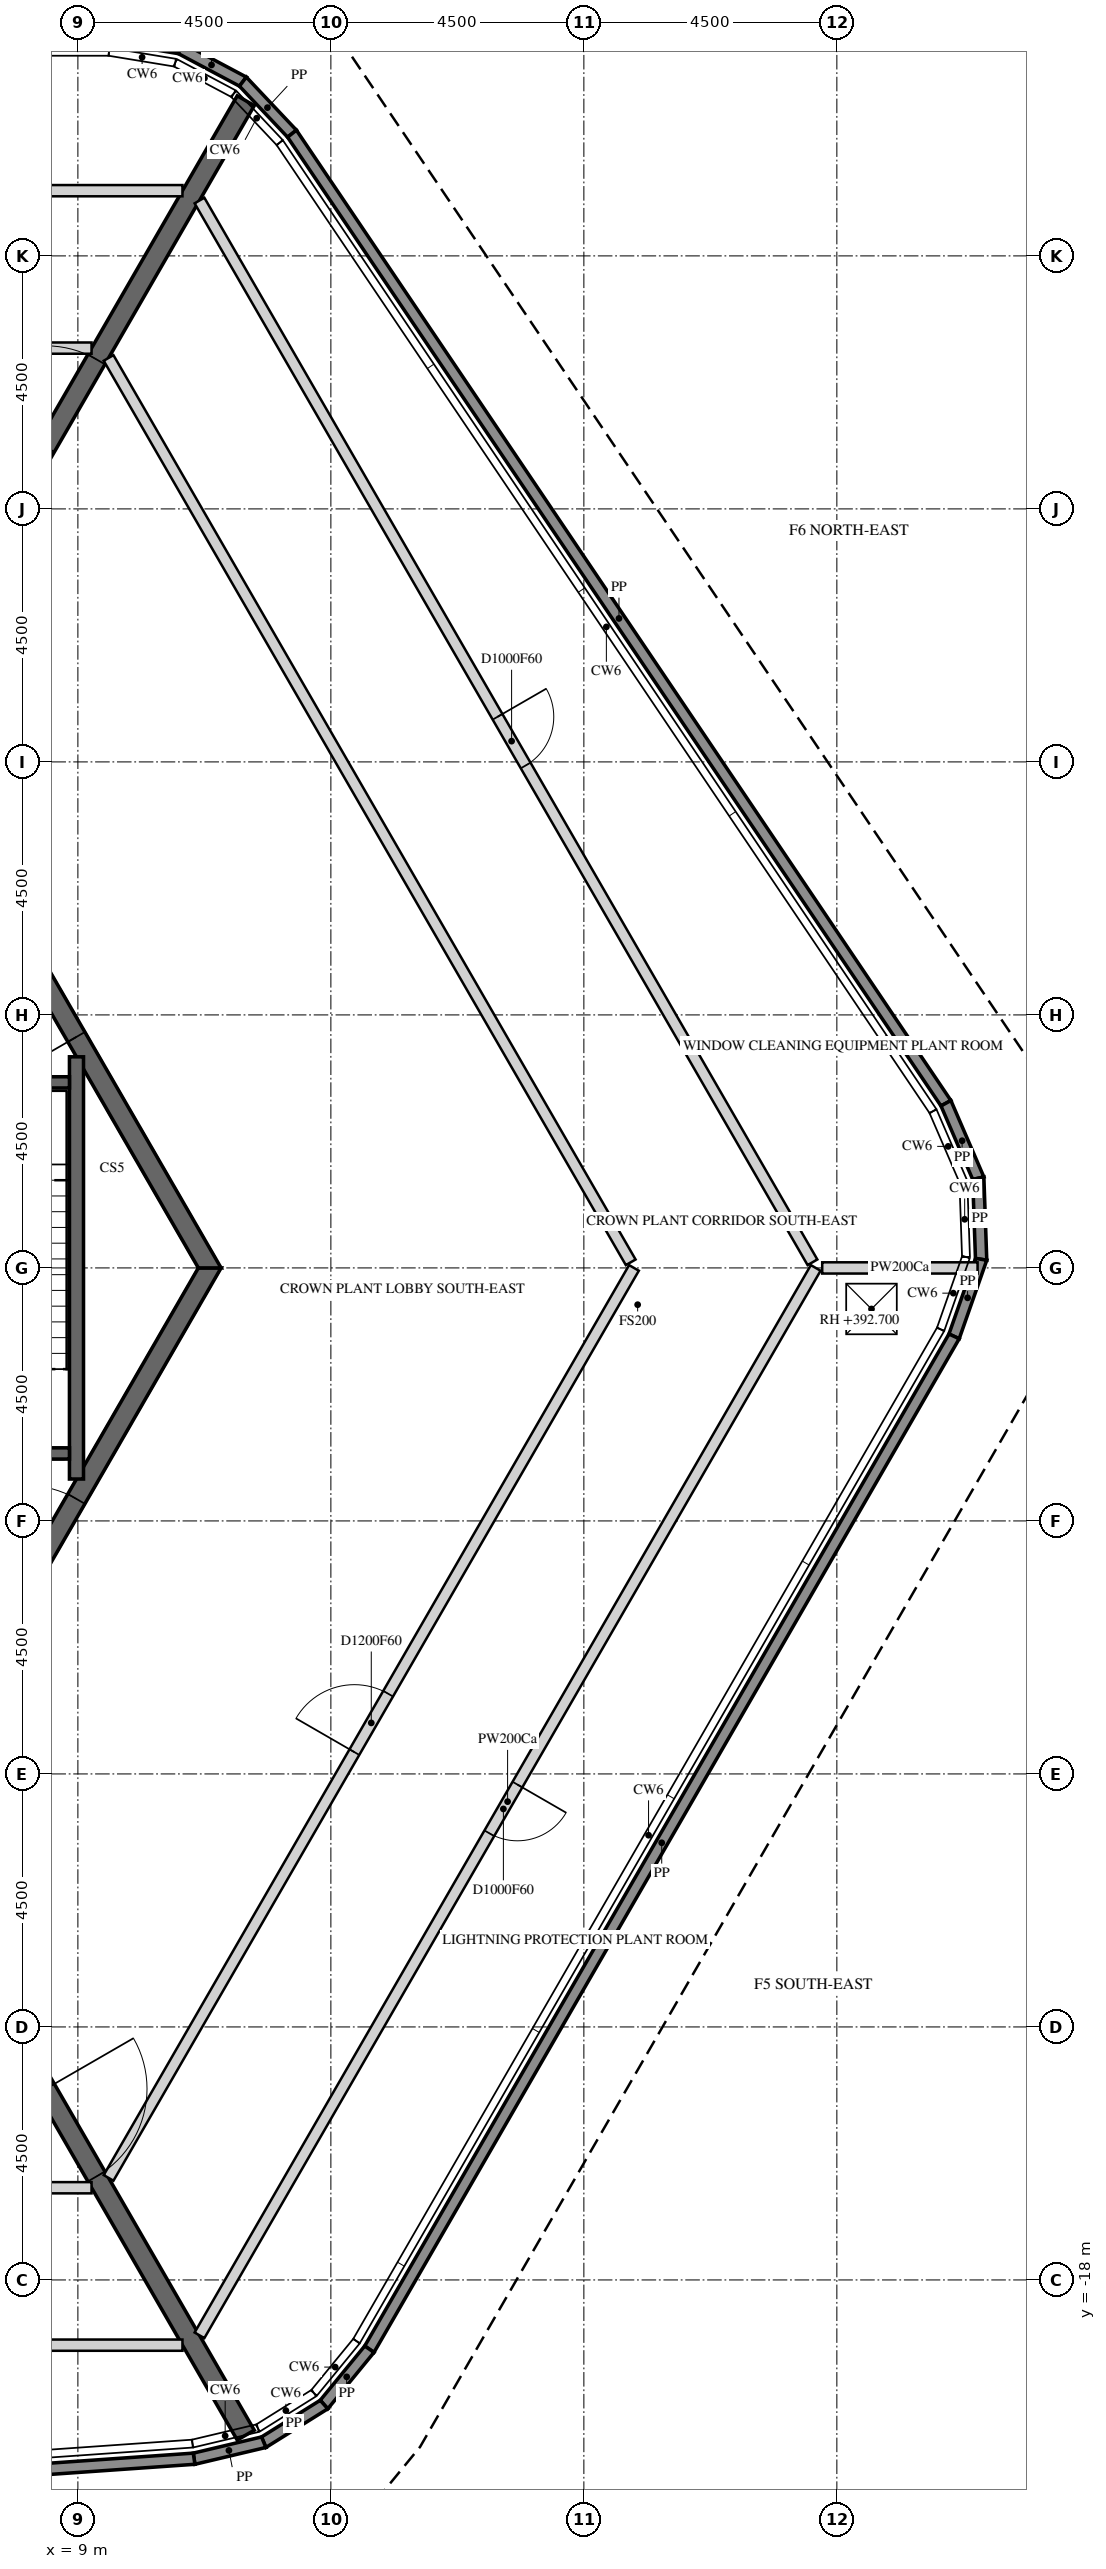
"""IFC4 building model, lengths in metres.
Left out: names, types, materials, properties, quantities, classifications, styles, units other than length and angle.
Written with IfcOpenShell. Run it as: python <this file> out.ifc"""

import sys

from ifc_helpers import new_model, si_unit, direction, frame, frame_2d, origin, origin_2d, place, context, subcontext, project, spatial, polyline, rectangle, outline, extrude, element, fill, save


model = new_model("IFC4")
c1 = context("Model", 3, precision=1e-05, world=origin(), true_north=direction((0.0, 1.0)))
c2 = subcontext(c1, "Body", "Model", "MODEL_VIEW")
j1 = project(units=[si_unit("LENGTHUNIT", "METRE"), si_unit("PLANEANGLEUNIT", "RADIAN")], contexts=[c1])
p1 = place(None, origin())
s1 = spatial("IfcSite", under=j1, at=p1, CompositionType="ELEMENT")
p2 = place(p1, origin())
s2 = spatial("IfcBuilding", under=s1, at=p2, CompositionType="ELEMENT")
p3 = place(p2, frame((0.0, 0.0, 388.2)))
s3 = spatial("IfcBuildingStorey", under=s2, at=p3, CompositionType="ELEMENT", Elevation=388.2)
p4 = place(p3, frame((9.562, 21.9, 4.5), z_axis=(0.0, 0.0, 1.0), x_axis=(0.986779937267, -0.162065898346, 0.0)))
e1 = element("IfcWall", 1, at=p4, inside=s3, PredefinedType="PARAPET", context=c2, shape_type="SweptSolid", body=[
    extrude(outline(polyline([(0.008, -0.1), (1.257, -0.1), (1.289, 0.1), (-0.008, 0.1), (0.008, -0.1)])), origin(), (0.0, 0.0, 1.0), 1.1),
])
p5 = place(p3, frame((10.819, 21.694, 4.5), z_axis=(0.0, 0.0, 1.0), x_axis=(0.88290815292, -0.469545731008, 0.0)))
e2 = element("IfcWall", 2, at=p5, inside=s3, PredefinedType="PARAPET", context=c2, shape_type="SweptSolid", body=[
    extrude(outline(polyline([(0.016, -0.1), (1.248, -0.1), (1.281, 0.1), (-0.016, 0.1), (0.016, -0.1)])), origin(), (0.0, 0.0, 1.0), 1.1),
])
p6 = place(p3, frame((11.935, 21.1, 4.5), z_axis=(0.0, 0.0, 1.0), x_axis=(0.686285527981, -0.727332230885, 0.0)))
e3 = element("IfcWall", 3, at=p6, inside=s3, PredefinedType="PARAPET", context=c2, shape_type="SweptSolid", body=[
    extrude(outline(polyline([(0.016, -0.1), (1.265, -0.1), (1.281, 0.1), (-0.016, 0.1), (0.016, -0.1)])), origin(), (0.0, 0.0, 1.0), 1.1),
])
p7 = place(p3, frame((12.809, 20.174, 4.5), z_axis=(0.0, 0.0, 1.0), x_axis=(0.559199078033, -0.829033407727, 0.0)))
e4 = element("IfcWall", 4, at=p7, inside=s3, PredefinedType="PARAPET", context=c2, shape_type="SweptSolid", body=[
    extrude(outline(polyline([(0.008, -0.1), (20.792, -0.1), (20.81, 0.1), (-0.008, 0.1), (0.008, -0.1)])), origin(), (0.0, 0.0, 1.0), 1.1),
])
p8 = place(p3, frame((24.44, 2.929, 4.5), z_axis=(0.0, 0.0, 1.0), x_axis=(0.39594663585, -0.918273522192, 0.0)))
e5 = element("IfcWall", 5, at=p8, inside=s3, PredefinedType="PARAPET", context=c2, shape_type="SweptSolid", body=[
    extrude(outline(polyline([(0.009, -0.1), (1.434, -0.1), (1.471, 0.1), (-0.009, 0.1), (0.009, -0.1)])), origin(), (0.0, 0.0, 1.0), 1.1),
])
p9 = place(p3, frame((25.016, 1.595, 4.5), z_axis=(0.0, 0.0, 1.0), x_axis=(0.034852691187, -0.999392460406, 0.0)))
e6 = element("IfcWall", 6, at=p9, inside=s3, PredefinedType="PARAPET", context=c2, shape_type="SweptSolid", body=[
    extrude(outline(polyline([(0.019, -0.1), (1.424, -0.1), (1.462, 0.1), (-0.019, 0.1), (0.019, -0.1)])), origin(), (0.0, 0.0, 1.0), 1.1),
])
p10 = place(p3, frame((25.066, 0.153, 4.5), z_axis=(0.0, 0.0, 1.0), x_axis=(-0.330964304762, -0.943643274216, 0.0)))
e7 = element("IfcWall", 7, at=p10, inside=s3, PredefinedType="PARAPET", context=c2, shape_type="SweptSolid", body=[
    extrude(outline(polyline([(0.019, -0.1), (1.443, -0.1), (1.462, 0.1), (-0.019, 0.1), (0.019, -0.1)])), origin(), (0.0, 0.0, 1.0), 1.1),
])
p11 = place(p3, frame((24.585, -1.217, 4.5), z_axis=(0.0, 0.0, 1.0), x_axis=(-0.500005572435, -0.866022186514, 0.0)))
e8 = element("IfcWall", 8, at=p11, inside=s3, PredefinedType="PARAPET", context=c2, shape_type="SweptSolid", body=[
    extrude(outline(polyline([(0.009, -0.1), (20.793, -0.1), (20.809, 0.1), (-0.009, 0.1), (0.009, -0.1)])), origin(), (0.0, 0.0, 1.0), 1.1),
])
p12 = place(p3, frame((14.185, -19.231, 4.5), z_axis=(0.0, 0.0, 1.0), x_axis=(-0.633728573492, -0.773555489374, 0.0)))
e9 = element("IfcWall", 9, at=p12, inside=s3, PredefinedType="PARAPET", context=c2, shape_type="SweptSolid", body=[
    extrude(outline(polyline([(0.008, -0.1), (1.257, -0.1), (1.289, 0.1), (-0.008, 0.1), (0.008, -0.1)])), origin(), (0.0, 0.0, 1.0), 1.1),
])
p13 = place(p3, frame((13.378, -20.216, 4.5), z_axis=(0.0, 0.0, 1.0), x_axis=(-0.848139277309, -0.529773315943, 0.0)))
e10 = element("IfcWall", 10, at=p13, inside=s3, PredefinedType="PARAPET", context=c2, shape_type="SweptSolid", body=[
    extrude(outline(polyline([(0.016, -0.1), (1.248, -0.1), (1.281, 0.1), (-0.016, 0.1), (0.016, -0.1)])), origin(), (0.0, 0.0, 1.0), 1.1),
])
p14 = place(p3, frame((12.305, -20.886, 4.5), z_axis=(0.0, 0.0, 1.0), x_axis=(-0.973015728144, -0.230738797744, 0.0)))
e11 = element("IfcWall", 11, at=p14, inside=s3, PredefinedType="PARAPET", context=c2, shape_type="SweptSolid", body=[
    extrude(outline(polyline([(0.016, -0.1), (1.265, -0.1), (1.281, 0.1), (-0.016, 0.1), (0.016, -0.1)])), origin(), (0.0, 0.0, 1.0), 1.1),
])
p15 = place(p3, frame((11.067, -21.18, 4.5), z_axis=(0.0, 0.0, 1.0), x_axis=(-0.997564286722, -0.06975309209, 0.0)))
e12 = element("IfcWall", 12, at=p15, inside=s3, PredefinedType="PARAPET", context=c2, shape_type="SweptSolid", body=[
    extrude(outline(polyline([(0.008, -0.1), (20.792, -0.1), (20.81, 0.1), (-0.008, 0.1), (0.008, -0.1)])), origin(), (0.0, 0.0, 1.0), 1.1),
])
p16 = place(p3, frame((5.673, -9.825, -0.2), z_axis=(0.0, 0.0, 1.0), x_axis=(0.499995046907, 0.866028263435, 0.0)))
e13 = element("IfcWall", 13, at=p16, inside=s3, PredefinedType="SHEAR", context=c2, shape_type="SweptSolid", body=[
    extrude(outline(polyline([(-0.101, -0.175), (11.446, -0.175), (11.244, 0.175), (0.101, 0.175), (-0.101, -0.175)])), origin(), (0.0, 0.0, 1.0), 4.5),
])
p17 = place(p16, frame((4.801, 0.0, 0.2)))
e14 = element("IfcOpeningElement", 14, at=p17, cuts=e13, PredefinedType="OPENING", context=c2, shape_type="SweptSolid", body=[
    extrude(rectangle(XDim=1.8, YDim=2.4, at=frame_2d((0.9, 1.2))), frame((0.0, 0.185, 0.0), z_axis=(0.0, -1.0, 0.0), x_axis=(1.0, 0.0, 0.0)), (0.0, 0.0, 1.0), 0.37),
])
p18 = place(p3, frame((11.345, 0.0, -0.2), z_axis=(0.0, 0.0, 1.0), x_axis=(-0.499995046907, 0.866028263435, 0.0)))
e15 = element("IfcWall", 15, at=p18, inside=s3, PredefinedType="SHEAR", context=c2, shape_type="SweptSolid", body=[
    extrude(outline(polyline([(-0.101, -0.175), (11.446, -0.175), (11.244, 0.175), (0.101, 0.175), (-0.101, -0.175)])), origin(), (0.0, 0.0, 1.0), 4.5),
])
p19 = place(p18, frame((4.744, 0.0, 0.2)))
e16 = element("IfcOpeningElement", 16, at=p19, cuts=e15, PredefinedType="OPENING", context=c2, shape_type="SweptSolid", body=[
    extrude(rectangle(XDim=1.8, YDim=2.4, at=frame_2d((0.9, 1.2))), frame((0.0, 0.185, 0.0), z_axis=(0.0, -1.0, 0.0), x_axis=(1.0, 0.0, 0.0)), (0.0, 0.0, 1.0), 0.37),
])
p20 = place(p3, frame((5.773, 10.0, -0.2), z_axis=(0.0, 0.0, 1.0), x_axis=(0.50001273609, 0.866018050475, 0.0)))
e17 = element("IfcWall", 17, at=p20, inside=s3, PredefinedType="SHEAR", context=c2, shape_type="SweptSolid", body=[
    extrude(rectangle(XDim=12.425, YDim=0.35, at=frame_2d((6.212, 0.0))), origin(), (0.0, 0.0, 1.0), 4.5),
])
p21 = place(p20, frame((5.312, 0.0, 0.2)))
e18 = element("IfcOpeningElement", 18, at=p21, cuts=e17, PredefinedType="OPENING", context=c2, shape_type="SweptSolid", body=[
    extrude(rectangle(XDim=1.8, YDim=2.4, at=frame_2d((0.9, 1.2))), frame((0.0, 0.185, 0.0), z_axis=(0.0, -1.0, 0.0), x_axis=(1.0, 0.0, 0.0)), (0.0, 0.0, 1.0), 0.37),
])
p22 = place(p3, frame((5.773, -10.0, -0.2), z_axis=(0.0, 0.0, 1.0), x_axis=(0.50001273609, -0.866018050475, 0.0)))
e19 = element("IfcWall", 19, at=p22, inside=s3, PredefinedType="SHEAR", context=c2, shape_type="SweptSolid", body=[
    extrude(rectangle(XDim=12.425, YDim=0.35, at=frame_2d((6.212, 0.0))), origin(), (0.0, 0.0, 1.0), 4.5),
])
p23 = place(p22, frame((5.312, 0.0, 0.2)))
e20 = element("IfcOpeningElement", 20, at=p23, cuts=e19, PredefinedType="OPENING", context=c2, shape_type="SweptSolid", body=[
    extrude(rectangle(XDim=1.8, YDim=2.4, at=frame_2d((0.9, 1.2))), frame((0.0, 0.185, 0.0), z_axis=(0.0, -1.0, 0.0), x_axis=(1.0, 0.0, 0.0)), (0.0, 0.0, 1.0), 0.37),
])
p24 = place(p3, frame((8.975, -3.755, -0.2), z_axis=(0.0, 0.0, 1.0), x_axis=(0.0, 1.0, 0.0)))
e21 = element("IfcWall", 21, at=p24, inside=s3, PredefinedType="SHEAR", context=c2, shape_type="SweptSolid", body=[
    extrude(rectangle(XDim=7.51, YDim=0.25, at=frame_2d((3.755, 0.0))), origin(), (0.0, 0.0, 1.0), 4.5),
])
p25 = place(p3, frame((5.9, 3.3, -0.2), z_axis=(0.0, 0.0, 1.0), x_axis=(1.0, 0.0, 0.0)))
e22 = element("IfcWall", 22, at=p25, inside=s3, PredefinedType="SHEAR", context=c2, shape_type="SweptSolid", body=[
    extrude(rectangle(XDim=2.95, YDim=0.2, at=frame_2d((1.475, 0.0))), origin(), (0.0, 0.0, 1.0), 4.5),
])
p26 = place(p3, frame((5.9, -3.3, -0.2), z_axis=(0.0, 0.0, 1.0), x_axis=(1.0, 0.0, 0.0)))
e23 = element("IfcWall", 23, at=p26, inside=s3, PredefinedType="SHEAR", context=c2, shape_type="SweptSolid", body=[
    extrude(rectangle(XDim=2.95, YDim=0.2, at=frame_2d((1.475, 0.0))), origin(), (0.0, 0.0, 1.0), 4.5),
])
p27 = place(p26, frame((0.875, 0.0, 0.2)))
e24 = element("IfcOpeningElement", 24, at=p27, cuts=e23, PredefinedType="OPENING", context=c2, shape_type="SweptSolid", body=[
    extrude(rectangle(XDim=1.2, YDim=2.4, at=frame_2d((0.6, 1.2))), frame((0.0, 0.11, 0.0), z_axis=(0.0, -1.0, 0.0), x_axis=(1.0, 0.0, 0.0)), (0.0, 0.0, 1.0), 0.22),
])
p28 = place(p3, frame((10.86, -19.16, 0.0), z_axis=(0.0, 0.0, 1.0), x_axis=(-1.0, 0.0, 0.0)))
e25 = element("IfcWall", 25, at=p28, inside=s3, PredefinedType="PARTITIONING", context=c2, shape_type="SweptSolid", body=[
    extrude(rectangle(XDim=21.807, YDim=0.2, at=frame_2d((10.903, 0.0))), origin(), (0.0, 0.0, 1.0), 4.3),
])
p29 = place(p28, frame((10.603, 0.0, 0.0)))
e26 = element("IfcOpeningElement", 26, at=p29, cuts=e25, PredefinedType="OPENING", context=c2, shape_type="SweptSolid", body=[
    extrude(rectangle(XDim=1.0, YDim=2.1, at=frame_2d((0.5, 1.05))), frame((0.0, 0.11, 0.0), z_axis=(0.0, -1.0, 0.0), x_axis=(1.0, 0.0, 0.0)), (0.0, 0.0, 1.0), 0.22),
])
for number, where, z_axis, x_axis in (
    (27, (-9.33, -16.36, 0.0), (0.0, 0.0, 1.0), (1.0, 0.0, 0.0)),
    (28, (9.243, 16.36, 0.0), (0.0, 0.0, 1.0), (-1.0, 0.0, 0.0)),
):
    element("IfcWall", number, at=place(p3, frame(where, z_axis=z_axis, x_axis=x_axis)), inside=s3, PredefinedType="PARTITIONING", context=c2, shape_type="SweptSolid", body=[
        extrude(rectangle(XDim=18.573, YDim=0.2, at=frame_2d((9.286, 0.0))), origin(), (0.0, 0.0, 1.0), 3.692),
    ])
p30 = place(p3, frame((9.546, -16.185, 0.0), z_axis=(0.0, 0.0, 1.0), x_axis=(0.500030775662, 0.866007634718, 0.0)))
e29 = element("IfcWall", 29, at=p30, inside=s3, PredefinedType="PARTITIONING", context=c2, shape_type="SweptSolid", body=[
    extrude(rectangle(XDim=18.689, YDim=0.2, at=frame_2d((9.345, 0.0))), origin(), (0.0, 0.0, 1.0), 3.692),
])
p31 = place(p30, frame((8.745, 0.0, 0.0)))
e30 = element("IfcOpeningElement", 30, at=p31, cuts=e29, PredefinedType="OPENING", context=c2, shape_type="SweptSolid", body=[
    extrude(rectangle(XDim=1.2, YDim=2.1, at=frame_2d((0.6, 1.05))), frame((0.0, 0.11, 0.0), z_axis=(0.0, -1.0, 0.0), x_axis=(1.0, 0.0, 0.0)), (0.0, 0.0, 1.0), 0.22),
])
p32 = place(p3, frame((-10.947, 19.16, 0.0), z_axis=(0.0, 0.0, 1.0), x_axis=(1.0, 0.0, 0.0)))
e31 = element("IfcWall", 31, at=p32, inside=s3, PredefinedType="PARTITIONING", context=c2, shape_type="SweptSolid", body=[
    extrude(rectangle(XDim=21.807, YDim=0.2, at=frame_2d((10.903, 0.0))), origin(), (0.0, 0.0, 1.0), 4.3),
])
p33 = place(p32, frame((10.503, 0.0, 0.0)))
e32 = element("IfcOpeningElement", 32, at=p33, cuts=e31, PredefinedType="OPENING", context=c2, shape_type="SweptSolid", body=[
    extrude(rectangle(XDim=1.0, YDim=2.1, at=frame_2d((0.5, 1.05))), frame((0.0, 0.11, 0.0), z_axis=(0.0, -1.0, 0.0), x_axis=(1.0, 0.0, 0.0)), (0.0, 0.0, 1.0), 0.22),
])
p34 = place(p3, frame((22.124, 0.0, 0.0), z_axis=(0.0, 0.0, 1.0), x_axis=(-0.49999591573, -0.866027761826, 0.0)))
e33 = element("IfcWall", 33, at=p34, inside=s3, PredefinedType="PARTITIONING", context=c2, shape_type="SweptSolid", body=[
    extrude(rectangle(XDim=21.922, YDim=0.2, at=frame_2d((10.961, 0.0))), origin(), (0.0, 0.0, 1.0), 4.3),
])
p35 = place(p34, frame((10.611, 0.0, 0.0)))
e34 = element("IfcOpeningElement", 34, at=p35, cuts=e33, PredefinedType="OPENING", context=c2, shape_type="SweptSolid", body=[
    extrude(rectangle(XDim=1.0, YDim=2.1, at=frame_2d((0.5, 1.05))), frame((0.0, 0.11, 0.0), z_axis=(0.0, -1.0, 0.0), x_axis=(1.0, 0.0, 0.0)), (0.0, 0.0, 1.0), 0.22),
])
p36 = place(p3, frame((18.833, 0.1, 0.0), z_axis=(0.0, 0.0, 1.0), x_axis=(-0.500028143963, 0.86600915425, 0.0)))
e35 = element("IfcWall", 35, at=p36, inside=s3, PredefinedType="PARTITIONING", context=c2, shape_type="SweptSolid", body=[
    extrude(rectangle(XDim=18.574, YDim=0.2, at=frame_2d((9.287, 0.0))), origin(), (0.0, 0.0, 1.0), 3.692),
])
p37 = place(p3, frame((11.163, 18.985, 0.0), z_axis=(0.0, 0.0, 1.0), x_axis=(0.499993489295, -0.866029162709, 0.0)))
e36 = element("IfcWall", 36, at=p37, inside=s3, PredefinedType="PARTITIONING", context=c2, shape_type="SweptSolid", body=[
    extrude(rectangle(XDim=21.806, YDim=0.2, at=frame_2d((10.903, 0.0))), origin(), (0.0, 0.0, 1.0), 4.3),
])
p38 = place(p37, frame((10.603, 0.0, 0.0)))
e37 = element("IfcOpeningElement", 37, at=p38, cuts=e36, PredefinedType="OPENING", context=c2, shape_type="SweptSolid", body=[
    extrude(rectangle(XDim=1.0, YDim=2.1, at=frame_2d((0.5, 1.05))), frame((0.0, 0.11, 0.0), z_axis=(0.0, -1.0, 0.0), x_axis=(1.0, 0.0, 0.0)), (0.0, 0.0, 1.0), 0.22),
])
p39 = place(p3, frame((25.003, 0.0, 0.0), z_axis=(0.0, 0.0, 1.0), x_axis=(-1.0, 0.0, 0.0)))
e38 = element("IfcWall", 38, at=p39, inside=s3, PredefinedType="PARTITIONING", context=c2, shape_type="SweptSolid", body=[
    extrude(rectangle(XDim=2.763, YDim=0.2, at=frame_2d((1.382, 0.0))), origin(), (0.0, 0.0, 1.0), 4.3),
])
p40 = place(p2, frame((0.0, 0.0, 392.7)))
p41 = place(p40, frame((0.0, 0.0, -0.2)))
p42 = place(p41, frame((23.116, -0.73, 0.0)))
p43 = place(p42, frame((0.0, 0.0, 0.15)))
e39 = element("IfcDoor", 39, at=p43, inside=s3, OperationType="SINGLE_SWING_LEFT", PredefinedType="TRAPDOOR", context=c2, shape_type="SweptSolid", body=[
    extrude(rectangle(XDim=0.9, YDim=0.9, at=origin_2d()), origin(), (0.0, 0.0, 1.0), 0.05),
])
p44 = place(p19, origin())
e40 = element("IfcDoor", 40, at=p44, inside=s3, OperationType="DOUBLE_DOOR_SINGLE_SWING", PredefinedType="DOOR", context=c2, shape_type="SweptSolid", body=[
    extrude(rectangle(XDim=1.8, YDim=2.4, at=frame_2d((0.9, 1.2))), frame((0.0, 0.025, 0.0), z_axis=(0.0, -1.0, 0.0), x_axis=(1.0, 0.0, 0.0)), (0.0, 0.0, 1.0), 0.05),
])
fill(e16, e40)
p45 = place(p17, origin())
e41 = element("IfcDoor", 41, at=p45, inside=s3, OperationType="DOUBLE_DOOR_SINGLE_SWING", PredefinedType="DOOR", context=c2, shape_type="SweptSolid", body=[
    extrude(rectangle(XDim=1.8, YDim=2.4, at=frame_2d((0.9, 1.2))), frame((0.0, 0.025, 0.0), z_axis=(0.0, -1.0, 0.0), x_axis=(1.0, 0.0, 0.0)), (0.0, 0.0, 1.0), 0.05),
])
fill(e14, e41)
p46 = place(p21, origin())
e42 = element("IfcDoor", 42, at=p46, inside=s3, OperationType="DOUBLE_DOOR_SINGLE_SWING", PredefinedType="DOOR", context=c2, shape_type="SweptSolid", body=[
    extrude(rectangle(XDim=1.8, YDim=2.4, at=frame_2d((0.9, 1.2))), frame((0.0, 0.025, 0.0), z_axis=(0.0, -1.0, 0.0), x_axis=(1.0, 0.0, 0.0)), (0.0, 0.0, 1.0), 0.05),
])
fill(e18, e42)
p47 = place(p23, origin())
e43 = element("IfcDoor", 43, at=p47, inside=s3, OperationType="DOUBLE_DOOR_SINGLE_SWING", PredefinedType="DOOR", context=c2, shape_type="SweptSolid", body=[
    extrude(rectangle(XDim=1.8, YDim=2.4, at=frame_2d((0.9, 1.2))), frame((0.0, 0.025, 0.0), z_axis=(0.0, -1.0, 0.0), x_axis=(1.0, 0.0, 0.0)), (0.0, 0.0, 1.0), 0.05),
])
fill(e20, e43)
p48 = place(p31, origin())
e44 = element("IfcDoor", 44, at=p48, inside=s3, OperationType="SINGLE_SWING_LEFT", PredefinedType="DOOR", context=c2, shape_type="SweptSolid", body=[
    extrude(rectangle(XDim=1.2, YDim=2.1, at=frame_2d((0.6, 1.05))), frame((0.0, 0.025, 0.0), z_axis=(0.0, -1.0, 0.0), x_axis=(1.0, 0.0, 0.0)), (0.0, 0.0, 1.0), 0.05),
])
fill(e30, e44)
p49 = place(p35, origin())
e45 = element("IfcDoor", 45, at=p49, inside=s3, OperationType="SINGLE_SWING_LEFT", PredefinedType="DOOR", context=c2, shape_type="SweptSolid", body=[
    extrude(rectangle(XDim=1.0, YDim=2.1, at=frame_2d((0.5, 1.05))), frame((0.0, 0.025, 0.0), z_axis=(0.0, -1.0, 0.0), x_axis=(1.0, 0.0, 0.0)), (0.0, 0.0, 1.0), 0.05),
])
fill(e34, e45)
p50 = place(p38, origin())
e46 = element("IfcDoor", 46, at=p50, inside=s3, OperationType="SINGLE_SWING_RIGHT", PredefinedType="DOOR", context=c2, shape_type="SweptSolid", body=[
    extrude(rectangle(XDim=1.0, YDim=2.1, at=frame_2d((0.5, 1.05))), frame((0.0, 0.025, 0.0), z_axis=(0.0, -1.0, 0.0), x_axis=(1.0, 0.0, 0.0)), (0.0, 0.0, 1.0), 0.05),
])
fill(e37, e46)
save(model, sys.argv[1])
